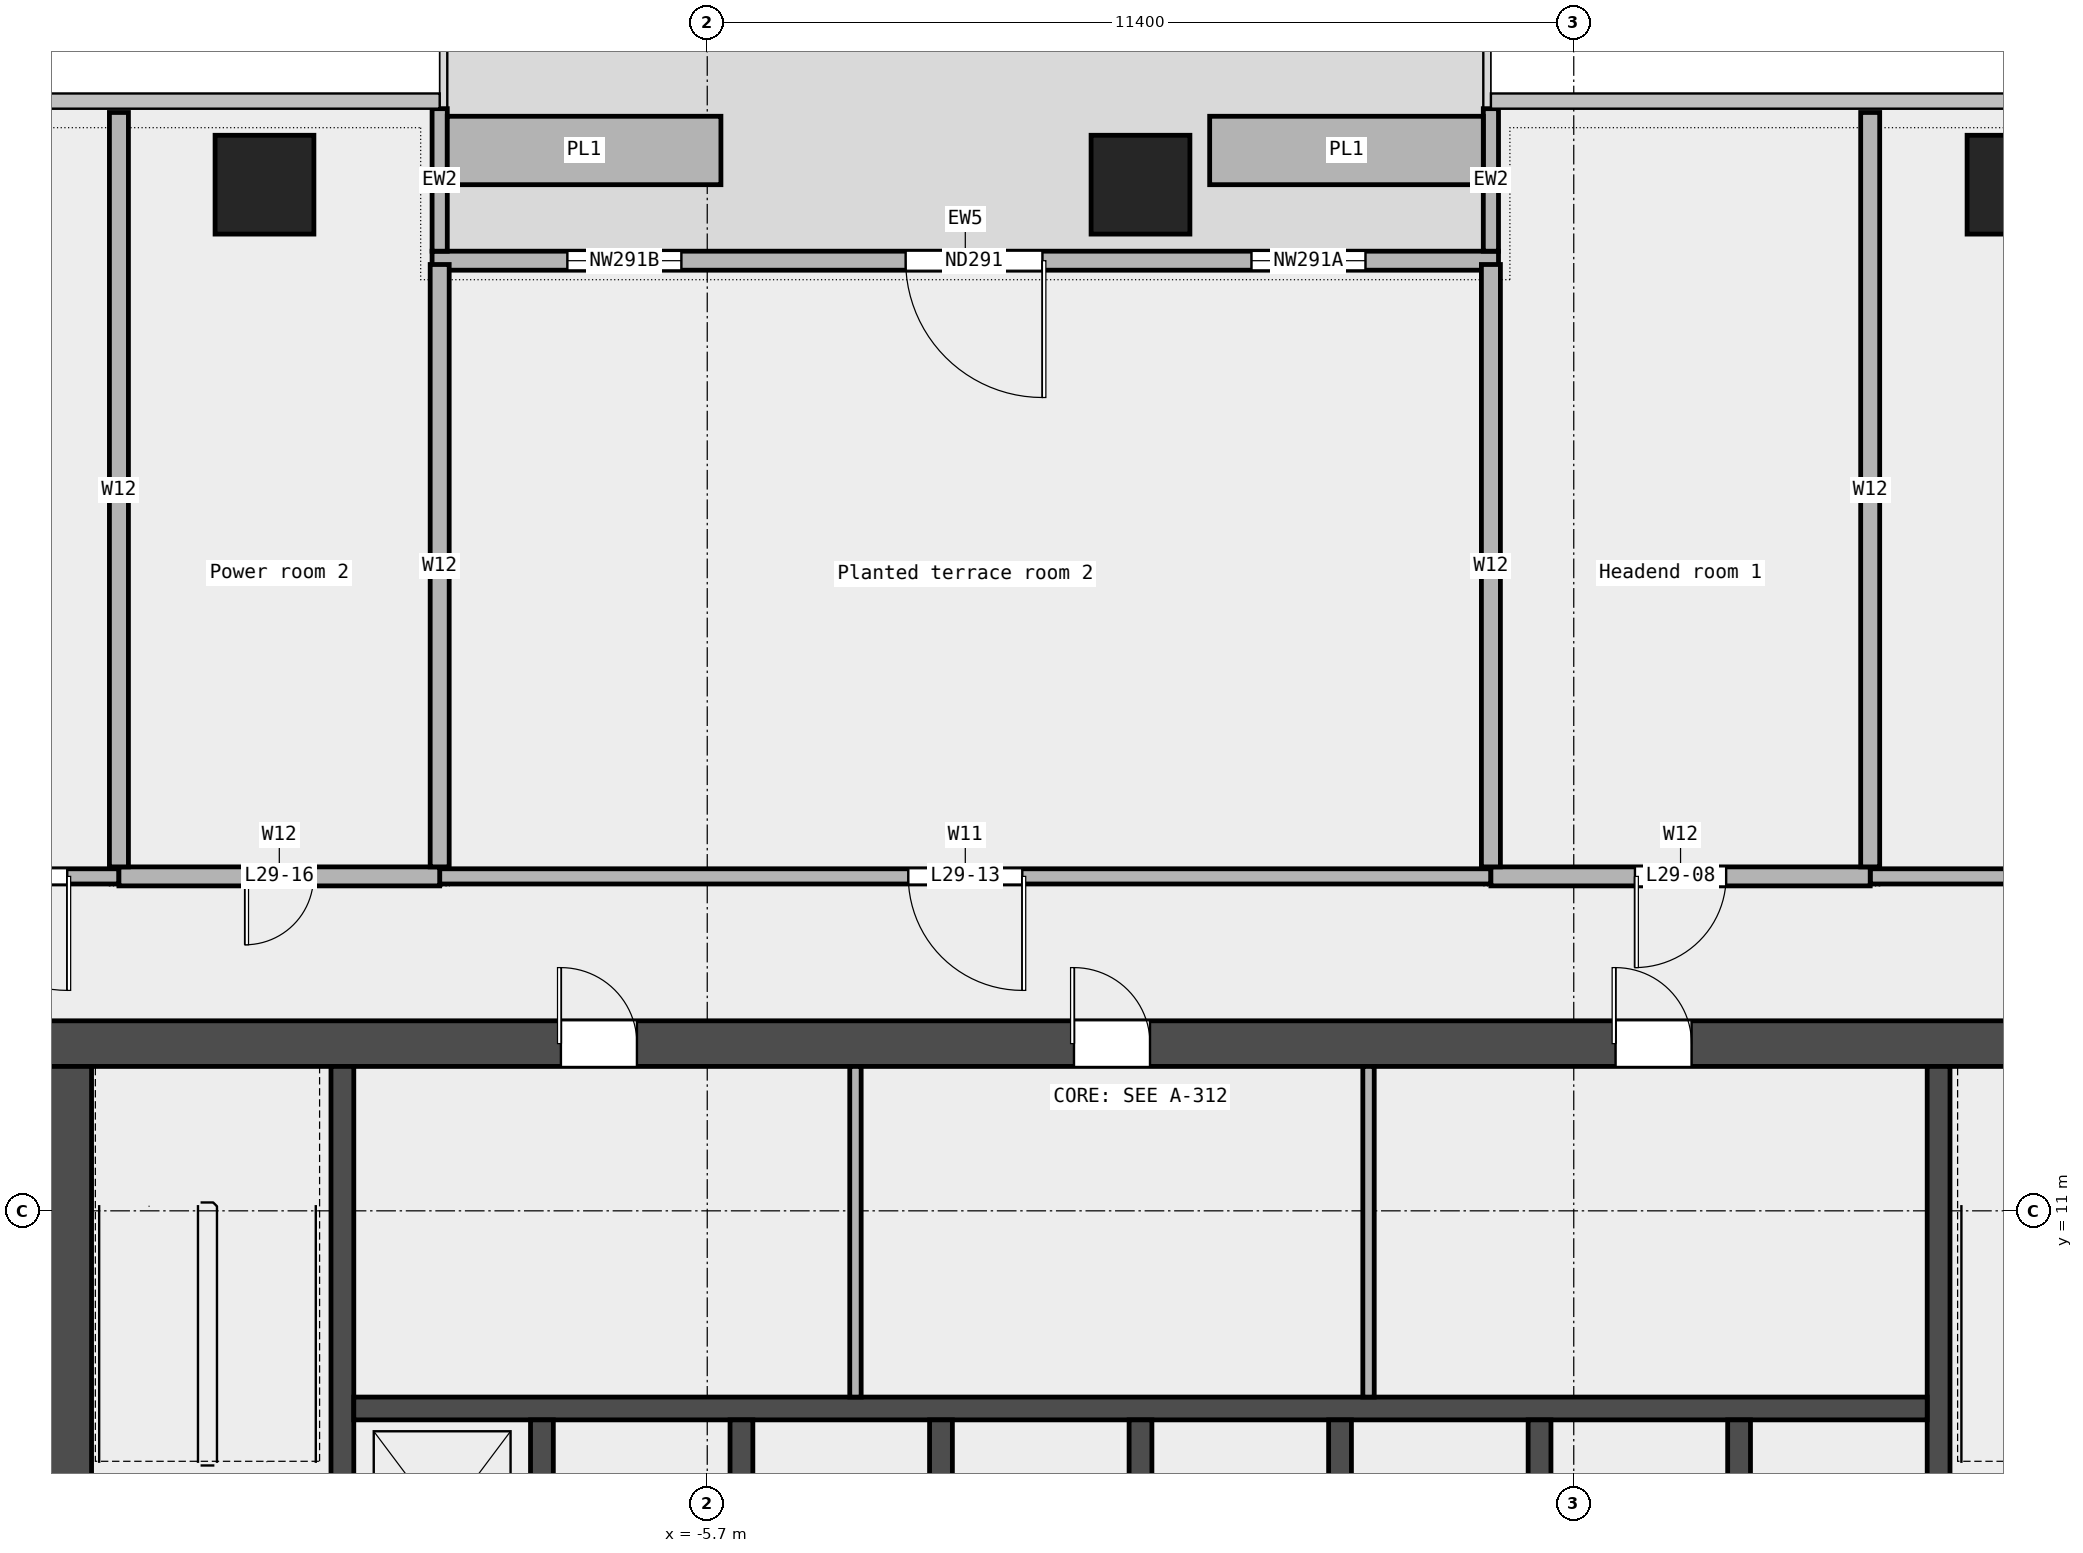
"""IFC4 building model, lengths in metres.
Left out: names, types, materials, properties, quantities, classifications, styles, units other than length and angle.
Written with IfcOpenShell. Run it as: python <this file> out.ifc"""

import sys

from ifc_helpers import new_model, si_unit, direction, frame, frame_2d, origin, origin_2d, place, context, subcontext, project, spatial, rectangle, extrude, element, fill, save


model = new_model("IFC4")
c1 = context("Model", 3, precision=1e-05, world=origin(), true_north=direction((0.0, 1.0)))
c2 = subcontext(c1, "Body", "Model", "MODEL_VIEW")
j1 = project(units=[si_unit("LENGTHUNIT", "METRE"), si_unit("PLANEANGLEUNIT", "RADIAN")], contexts=[c1])
p1 = place(None, origin())
s1 = spatial("IfcSite", under=j1, at=p1, CompositionType="ELEMENT")
p2 = place(p1, origin())
s2 = spatial("IfcBuilding", under=s1, at=p2, CompositionType="ELEMENT")
p3 = place(p2, frame((0.0, 0.0, 144.1)))
s3 = spatial("IfcBuildingStorey", under=s2, at=p3, CompositionType="ELEMENT", Elevation=144.1)
for number, where, z_axis, x_axis in (
    (1, (11.525, 24.5, 0.0), (0.0, 0.0, 1.0), (1.0, 0.0, 0.0)),
    (2, (0.0, 24.5, 0.0), (0.0, 0.0, 1.0), (1.0, 0.0, 0.0)),
    (3, (-11.525, 24.5, 0.0), (0.0, 0.0, 1.0), (1.0, 0.0, 0.0)),
):
    element("IfcColumn", number, at=place(p3, frame(where, z_axis=z_axis, x_axis=x_axis)), inside=s3, PredefinedType="COLUMN", context=c2, shape_type="SweptSolid", body=[
        extrude(rectangle(XDim=1.3, YDim=1.3, at=origin_2d()), origin(), (0.0, 0.0, 1.0), 3.9),
    ])
p4 = place(p3, frame((4.71, 23.5, 0.0), z_axis=(0.0, 0.0, 1.0), x_axis=(-1.0, 0.0, 0.0)))
e4 = element("IfcWall", 4, at=p4, inside=s3, PredefinedType="STANDARD", context=c2, shape_type="SweptSolid", body=[
    extrude(rectangle(XDim=14.03, YDim=0.25, at=frame_2d((7.015, 0.0))), origin(), (0.0, 0.0, 1.0), 3.9),
])
p5 = place(p4, frame((1.75, 0.0, 0.45)))
e5 = element("IfcOpeningElement", 5, at=p5, cuts=e4, PredefinedType="OPENING", context=c2, shape_type="SweptSolid", body=[
    extrude(rectangle(XDim=1.5, YDim=2.4, at=frame_2d((0.75, 1.2))), frame((0.0, 0.137, 0.0), z_axis=(0.0, -1.0, 0.0), x_axis=(1.0, 0.0, 0.0)), (0.0, 0.0, 1.0), 0.274),
])
p6 = place(p4, frame((6.0, 0.0, 0.0)))
e6 = element("IfcOpeningElement", 6, at=p6, cuts=e4, PredefinedType="OPENING", context=c2, shape_type="SweptSolid", body=[
    extrude(rectangle(XDim=1.8, YDim=2.4, at=frame_2d((0.9, 1.2))), frame((0.0, 0.137, 0.0), z_axis=(0.0, -1.0, 0.0), x_axis=(1.0, 0.0, 0.0)), (0.0, 0.0, 1.0), 0.274),
])
p7 = place(p4, frame((10.75, 0.0, 0.45)))
e7 = element("IfcOpeningElement", 7, at=p7, cuts=e4, PredefinedType="OPENING", context=c2, shape_type="SweptSolid", body=[
    extrude(rectangle(XDim=1.5, YDim=2.4, at=frame_2d((0.75, 1.2))), frame((0.0, 0.137, 0.0), z_axis=(0.0, -1.0, 0.0), x_axis=(1.0, 0.0, 0.0)), (0.0, 0.0, 1.0), 0.274),
])
for number, where, z_axis, x_axis in (
    (8, (4.61, 25.5, 0.0), (0.0, 0.0, 1.0), (0.0, -1.0, 0.0)),
    (9, (-9.22, 25.5, 0.0), (0.0, 0.0, 1.0), (0.0, -1.0, 0.0)),
):
    element("IfcWall", number, at=place(p3, frame(where, z_axis=z_axis, x_axis=x_axis)), inside=s3, PredefinedType="STANDARD", context=c2, shape_type="SweptSolid", body=[
        extrude(rectangle(XDim=1.875, YDim=0.2, at=frame_2d((0.938, 0.0))), origin(), (0.0, 0.0, 1.0), 3.9),
    ])
for number, where, z_axis, x_axis in (
    (10, (4.51, 24.95, 0.0), (0.0, 0.0, 1.0), (-1.0, 0.0, 0.0)),
    (11, (-5.52, 24.95, 0.0), (0.0, 0.0, 1.0), (-1.0, 0.0, 0.0)),
):
    element("IfcWall", number, at=place(p3, frame(where, z_axis=z_axis, x_axis=x_axis)), inside=s3, PredefinedType="STANDARD", context=c2, shape_type="SweptSolid", body=[
        extrude(rectangle(XDim=3.6, YDim=0.9, at=frame_2d((1.8, 0.0))), origin(), (0.0, 0.0, 1.0), 0.7),
    ])
p8 = place(p3, frame((-16.3, 15.4, 0.0), z_axis=(0.0, 0.0, 1.0), x_axis=(1.0, 0.0, 0.0)))
e12 = element("IfcWall", 12, at=p8, inside=s3, PredefinedType="PARTITIONING", context=c2, shape_type="SweptSolid", body=[
    extrude(rectangle(XDim=2.86, YDim=0.2, at=frame_2d((1.43, 0.0))), origin(), (0.0, 0.0, 1.0), 3.9),
])
p9 = place(p8, frame((0.68, 0.0, 0.0)))
e13 = element("IfcOpeningElement", 13, at=p9, cuts=e12, PredefinedType="OPENING", context=c2, shape_type="SweptSolid", body=[
    extrude(rectangle(XDim=1.5, YDim=2.1, at=frame_2d((0.75, 1.05))), frame((0.0, 0.112, 0.0), z_axis=(0.0, -1.0, 0.0), x_axis=(1.0, 0.0, 0.0)), (0.0, 0.0, 1.0), 0.224),
])
p10 = place(p3, frame((-9.22, 15.4, 0.0), z_axis=(0.0, 0.0, 1.0), x_axis=(1.0, 0.0, 0.0)))
e14 = element("IfcWall", 14, at=p10, inside=s3, PredefinedType="PARTITIONING", context=c2, shape_type="SweptSolid", body=[
    extrude(rectangle(XDim=13.83, YDim=0.2, at=frame_2d((6.915, 0.0))), origin(), (0.0, 0.0, 1.0), 3.9),
])
p11 = place(p10, frame((6.165, 0.0, 0.0)))
e15 = element("IfcOpeningElement", 15, at=p11, cuts=e14, PredefinedType="OPENING", context=c2, shape_type="SweptSolid", body=[
    extrude(rectangle(XDim=1.5, YDim=2.1, at=frame_2d((0.75, 1.05))), frame((0.0, 0.112, 0.0), z_axis=(0.0, -1.0, 0.0), x_axis=(1.0, 0.0, 0.0)), (0.0, 0.0, 1.0), 0.224),
])
p12 = place(p3, frame((9.6, 15.4, 0.0), z_axis=(0.0, 0.0, 1.0), x_axis=(1.0, 0.0, 0.0)))
e16 = element("IfcWall", 16, at=p12, inside=s3, PredefinedType="PARTITIONING", context=c2, shape_type="SweptSolid", body=[
    extrude(rectangle(XDim=6.7, YDim=0.2, at=frame_2d((3.35, 0.0))), origin(), (0.0, 0.0, 1.0), 3.9),
])
p13 = place(p12, frame((2.45, 0.0, 0.0)))
e17 = element("IfcOpeningElement", 17, at=p13, cuts=e16, PredefinedType="OPENING", context=c2, shape_type="SweptSolid", body=[
    extrude(rectangle(XDim=1.8, YDim=2.1, at=frame_2d((0.9, 1.05))), frame((0.0, 0.112, 0.0), z_axis=(0.0, -1.0, 0.0), x_axis=(1.0, 0.0, 0.0)), (0.0, 0.0, 1.0), 0.224),
])
p14 = place(p3, frame((-13.44, 15.4, 0.0), z_axis=(0.0, 0.0, 1.0), x_axis=(1.0, 0.0, 0.0)))
e18 = element("IfcWall", 18, at=p14, inside=s3, PredefinedType="PARTITIONING", context=c2, shape_type="SweptSolid", body=[
    extrude(rectangle(XDim=4.22, YDim=0.25, at=frame_2d((2.11, 0.0))), origin(), (0.0, 0.0, 1.0), 3.9),
])
p15 = place(p14, frame((1.66, 0.0, 0.0)))
e19 = element("IfcOpeningElement", 19, at=p15, cuts=e18, PredefinedType="OPENING", context=c2, shape_type="SweptSolid", body=[
    extrude(rectangle(XDim=0.9, YDim=2.1, at=frame_2d((0.45, 1.05))), frame((0.0, 0.137, 0.0), z_axis=(0.0, -1.0, 0.0), x_axis=(1.0, 0.0, 0.0)), (0.0, 0.0, 1.0), 0.274),
])
p16 = place(p3, frame((4.61, 15.4, 0.0), z_axis=(0.0, 0.0, 1.0), x_axis=(1.0, 0.0, 0.0)))
e20 = element("IfcWall", 20, at=p16, inside=s3, PredefinedType="PARTITIONING", context=c2, shape_type="SweptSolid", body=[
    extrude(rectangle(XDim=4.99, YDim=0.25, at=frame_2d((2.495, 0.0))), origin(), (0.0, 0.0, 1.0), 3.9),
])
p17 = place(p16, frame((1.895, 0.0, 0.0)))
e21 = element("IfcOpeningElement", 21, at=p17, cuts=e20, PredefinedType="OPENING", context=c2, shape_type="SweptSolid", body=[
    extrude(rectangle(XDim=1.2, YDim=2.1, at=frame_2d((0.6, 1.05))), frame((0.0, 0.137, 0.0), z_axis=(0.0, -1.0, 0.0), x_axis=(1.0, 0.0, 0.0)), (0.0, 0.0, 1.0), 0.274),
])
p18 = place(p3, frame((-13.44, 15.525, 0.0), z_axis=(0.0, 0.0, 1.0), x_axis=(0.0, 1.0, 0.0)))
e22 = element("IfcWall", 22, at=p18, inside=s3, PredefinedType="PARTITIONING", context=c2, shape_type="SweptSolid", body=[
    extrude(rectangle(XDim=9.925, YDim=0.25, at=frame_2d((4.962, 0.0))), origin(), (0.0, 0.0, 1.0), 3.9),
])
for number, where, z_axis, x_axis in (
    (23, (-9.22, 15.525, 0.0), (0.0, 0.0, 1.0), (0.0, 1.0, 0.0)),
    (24, (4.61, 15.525, 0.0), (0.0, 0.0, 1.0), (0.0, 1.0, 0.0)),
):
    element("IfcWall", number, at=place(p3, frame(where, z_axis=z_axis, x_axis=x_axis)), inside=s3, PredefinedType="PARTITIONING", context=c2, shape_type="SweptSolid", body=[
        extrude(rectangle(XDim=7.925, YDim=0.25, at=frame_2d((3.962, 0.0))), origin(), (0.0, 0.0, 1.0), 3.9),
    ])
p19 = place(p3, frame((9.6, 15.525, 0.0), z_axis=(0.0, 0.0, 1.0), x_axis=(0.0, 1.0, 0.0)))
e25 = element("IfcWall", 25, at=p19, inside=s3, PredefinedType="PARTITIONING", context=c2, shape_type="SweptSolid", body=[
    extrude(rectangle(XDim=9.925, YDim=0.25, at=frame_2d((4.962, 0.0))), origin(), (0.0, 0.0, 1.0), 3.9),
])
p20 = place(p3, frame((-14.4, 13.2, 0.0), z_axis=(0.0, 0.0, 1.0), x_axis=(1.0, 0.0, 0.0)))
e26 = element("IfcWall", 26, at=p20, inside=s3, PredefinedType="SHEAR", context=c2, shape_type="SweptSolid", body=[
    extrude(rectangle(XDim=28.8, YDim=0.6, at=frame_2d((14.4, 0.0))), origin(), (0.0, 0.0, 1.0), 4.2),
])
p21 = place(p20, frame((6.775, 0.0, 0.0)))
e27 = element("IfcOpeningElement", 27, at=p21, cuts=e26, PredefinedType="OPENING", context=c2, shape_type="SweptSolid", body=[
    extrude(rectangle(XDim=1.0, YDim=2.1, at=frame_2d((0.5, 1.05))), frame((0.0, 0.312, 0.0), z_axis=(0.0, -1.0, 0.0), x_axis=(1.0, 0.0, 0.0)), (0.0, 0.0, 1.0), 0.624),
])
p22 = place(p20, frame((13.525, 0.0, 0.0)))
e28 = element("IfcOpeningElement", 28, at=p22, cuts=e26, PredefinedType="OPENING", context=c2, shape_type="SweptSolid", body=[
    extrude(rectangle(XDim=1.0, YDim=2.1, at=frame_2d((0.5, 1.05))), frame((0.0, 0.312, 0.0), z_axis=(0.0, -1.0, 0.0), x_axis=(1.0, 0.0, 0.0)), (0.0, 0.0, 1.0), 0.624),
])
p23 = place(p20, frame((20.65, 0.0, 0.0)))
e29 = element("IfcOpeningElement", 29, at=p23, cuts=e26, PredefinedType="OPENING", context=c2, shape_type="SweptSolid", body=[
    extrude(rectangle(XDim=1.0, YDim=2.1, at=frame_2d((0.5, 1.05))), frame((0.0, 0.312, 0.0), z_axis=(0.0, -1.0, 0.0), x_axis=(1.0, 0.0, 0.0)), (0.0, 0.0, 1.0), 0.624),
])
p24 = place(p3, frame((-14.1, -6.6, 0.0), z_axis=(0.0, 0.0, 1.0), x_axis=(0.0, 1.0, 0.0)))
e30 = element("IfcWall", 30, at=p24, inside=s3, PredefinedType="SHEAR", context=c2, shape_type="SweptSolid", body=[
    extrude(rectangle(XDim=19.5, YDim=0.6, at=frame_2d((9.75, 0.0))), origin(), (0.0, 0.0, 1.0), 4.2),
])
p25 = place(p24, frame((9.3, 0.0, 0.0)))
e31 = element("IfcOpeningElement", 31, at=p25, cuts=e30, PredefinedType="OPENING", context=c2, shape_type="SweptSolid", body=[
    extrude(rectangle(XDim=1.8, YDim=2.1, at=frame_2d((0.9, 1.05))), frame((0.0, 0.312, 0.0), z_axis=(0.0, -1.0, 0.0), x_axis=(1.0, 0.0, 0.0)), (0.0, 0.0, 1.0), 0.624),
])
for number, where, z_axis, x_axis in (
    (32, (-10.5, 5.25, 0.0), (0.0, 0.0, 1.0), (0.0, 1.0, 0.0)),
    (33, (10.5, 5.25, 0.0), (0.0, 0.0, 1.0), (0.0, 1.0, 0.0)),
):
    element("IfcWall", number, at=place(p3, frame(where, z_axis=z_axis, x_axis=x_axis)), inside=s3, PredefinedType="SHEAR", context=c2, shape_type="SweptSolid", body=[
        extrude(rectangle(XDim=7.65, YDim=0.3, at=frame_2d((3.825, 0.0))), origin(), (0.0, 0.0, 1.0), 4.2),
    ])
p26 = place(p3, frame((-10.35, 8.4, 0.0), z_axis=(0.0, 0.0, 1.0), x_axis=(1.0, 0.0, 0.0)))
e34 = element("IfcWall", 34, at=p26, inside=s3, PredefinedType="SOLIDWALL", context=c2, shape_type="SweptSolid", body=[
    extrude(rectangle(XDim=20.7, YDim=0.3, at=frame_2d((10.35, 0.0))), origin(), (0.0, 0.0, 1.0), 4.2),
])
for number, where, z_axis, x_axis in (
    (35, (-7.875, 5.55, 0.0), (0.0, 0.0, 1.0), (0.0, 1.0, 0.0)),
    (36, (-5.25, 5.55, 0.0), (0.0, 0.0, 1.0), (0.0, 1.0, 0.0)),
    (37, (-2.625, 5.55, 0.0), (0.0, 0.0, 1.0), (0.0, 1.0, 0.0)),
    (38, (0.0, 5.55, 0.0), (0.0, 0.0, 1.0), (0.0, 1.0, 0.0)),
    (39, (2.625, 5.55, 0.0), (0.0, 0.0, 1.0), (0.0, 1.0, 0.0)),
    (40, (5.25, 5.55, 0.0), (0.0, 0.0, 1.0), (0.0, 1.0, 0.0)),
    (41, (7.875, 5.55, 0.0), (0.0, 0.0, 1.0), (0.0, 1.0, 0.0)),
):
    element("IfcWall", number, at=place(p3, frame(where, z_axis=z_axis, x_axis=x_axis)), inside=s3, PredefinedType="SOLIDWALL", context=c2, shape_type="SweptSolid", body=[
        extrude(rectangle(XDim=2.7, YDim=0.3, at=frame_2d((1.35, 0.0))), origin(), (0.0, 0.0, 1.0), 4.2),
    ])
for number, where, z_axis, x_axis in (
    (42, (-3.75, 8.55, 0.0), (0.0, 0.0, 1.0), (0.0, 1.0, 0.0)),
    (43, (3.0, 8.55, 0.0), (0.0, 0.0, 1.0), (0.0, 1.0, 0.0)),
):
    element("IfcWall", number, at=place(p3, frame(where, z_axis=z_axis, x_axis=x_axis)), inside=s3, PredefinedType="PARTITIONING", context=c2, shape_type="SweptSolid", body=[
        extrude(rectangle(XDim=4.35, YDim=0.15, at=frame_2d((2.175, 0.0))), origin(), (0.0, 0.0, 1.0), 4.2),
    ])
p27 = place(p5, origin())
e44 = element("IfcWindow", 44, at=p27, inside=s3, PartitioningType="SINGLE_PANEL", PredefinedType="WINDOW", context=c2, shape_type="SweptSolid", body=[
    extrude(rectangle(XDim=1.5, YDim=2.4, at=frame_2d((0.75, 1.2))), frame((0.0, 0.03, 0.0), z_axis=(0.0, -1.0, 0.0), x_axis=(1.0, 0.0, 0.0)), (0.0, 0.0, 1.0), 0.06),
])
fill(e5, e44)
p28 = place(p6, origin())
e45 = element("IfcDoor", 45, at=p28, inside=s3, OperationType="DOUBLE_DOOR_SINGLE_SWING", PredefinedType="DOOR", context=c2, shape_type="SweptSolid", body=[
    extrude(rectangle(XDim=1.8, YDim=2.4, at=frame_2d((0.9, 1.2))), frame((0.0, 0.025, 0.0), z_axis=(0.0, -1.0, 0.0), x_axis=(1.0, 0.0, 0.0)), (0.0, 0.0, 1.0), 0.05),
])
fill(e6, e45)
p29 = place(p7, origin())
e46 = element("IfcWindow", 46, at=p29, inside=s3, PartitioningType="SINGLE_PANEL", PredefinedType="WINDOW", context=c2, shape_type="SweptSolid", body=[
    extrude(rectangle(XDim=1.5, YDim=2.4, at=frame_2d((0.75, 1.2))), frame((0.0, 0.03, 0.0), z_axis=(0.0, -1.0, 0.0), x_axis=(1.0, 0.0, 0.0)), (0.0, 0.0, 1.0), 0.06),
])
fill(e7, e46)
p30 = place(p17, origin())
e47 = element("IfcDoor", 47, at=p30, inside=s3, OperationType="SINGLE_SWING_RIGHT", PredefinedType="DOOR", context=c2, shape_type="SweptSolid", body=[
    extrude(rectangle(XDim=1.2, YDim=2.1, at=frame_2d((0.6, 1.05))), frame((0.0, 0.025, 0.0), z_axis=(0.0, -1.0, 0.0), x_axis=(1.0, 0.0, 0.0)), (0.0, 0.0, 1.0), 0.05),
])
fill(e21, e47)
p31 = place(p9, origin())
e48 = element("IfcDoor", 48, at=p31, inside=s3, OperationType="DOUBLE_DOOR_SINGLE_SWING", PredefinedType="DOOR", context=c2, shape_type="SweptSolid", body=[
    extrude(rectangle(XDim=1.5, YDim=2.1, at=frame_2d((0.75, 1.05))), frame((0.0, 0.025, 0.0), z_axis=(0.0, -1.0, 0.0), x_axis=(1.0, 0.0, 0.0)), (0.0, 0.0, 1.0), 0.05),
])
fill(e13, e48)
p32 = place(p11, origin())
e49 = element("IfcDoor", 49, at=p32, inside=s3, OperationType="DOUBLE_DOOR_SINGLE_SWING", PredefinedType="DOOR", context=c2, shape_type="SweptSolid", body=[
    extrude(rectangle(XDim=1.5, YDim=2.1, at=frame_2d((0.75, 1.05))), frame((0.0, 0.025, 0.0), z_axis=(0.0, -1.0, 0.0), x_axis=(1.0, 0.0, 0.0)), (0.0, 0.0, 1.0), 0.05),
])
fill(e15, e49)
p33 = place(p15, origin())
e50 = element("IfcDoor", 50, at=p33, inside=s3, OperationType="SINGLE_SWING_RIGHT", PredefinedType="DOOR", context=c2, shape_type="SweptSolid", body=[
    extrude(rectangle(XDim=0.9, YDim=2.1, at=frame_2d((0.45, 1.05))), frame((0.0, 0.025, 0.0), z_axis=(0.0, -1.0, 0.0), x_axis=(1.0, 0.0, 0.0)), (0.0, 0.0, 1.0), 0.05),
])
fill(e19, e50)
p34 = place(p21, origin())
e51 = element("IfcDoor", 51, at=p34, inside=s3, OperationType="SINGLE_SWING_LEFT", PredefinedType="DOOR", context=c2, shape_type="SweptSolid", body=[
    extrude(rectangle(XDim=1.0, YDim=2.1, at=frame_2d((0.5, 1.05))), frame((0.0, 0.025, 0.0), z_axis=(0.0, -1.0, 0.0), x_axis=(1.0, 0.0, 0.0)), (0.0, 0.0, 1.0), 0.05),
])
fill(e27, e51)
p35 = place(p22, origin())
e52 = element("IfcDoor", 52, at=p35, inside=s3, OperationType="SINGLE_SWING_LEFT", PredefinedType="DOOR", context=c2, shape_type="SweptSolid", body=[
    extrude(rectangle(XDim=1.0, YDim=2.1, at=frame_2d((0.5, 1.05))), frame((0.0, 0.025, 0.0), z_axis=(0.0, -1.0, 0.0), x_axis=(1.0, 0.0, 0.0)), (0.0, 0.0, 1.0), 0.05),
])
fill(e28, e52)
p36 = place(p23, origin())
e53 = element("IfcDoor", 53, at=p36, inside=s3, OperationType="SINGLE_SWING_LEFT", PredefinedType="DOOR", context=c2, shape_type="SweptSolid", body=[
    extrude(rectangle(XDim=1.0, YDim=2.1, at=frame_2d((0.5, 1.05))), frame((0.0, 0.025, 0.0), z_axis=(0.0, -1.0, 0.0), x_axis=(1.0, 0.0, 0.0)), (0.0, 0.0, 1.0), 0.05),
])
fill(e29, e53)
save(model, sys.argv[1])
